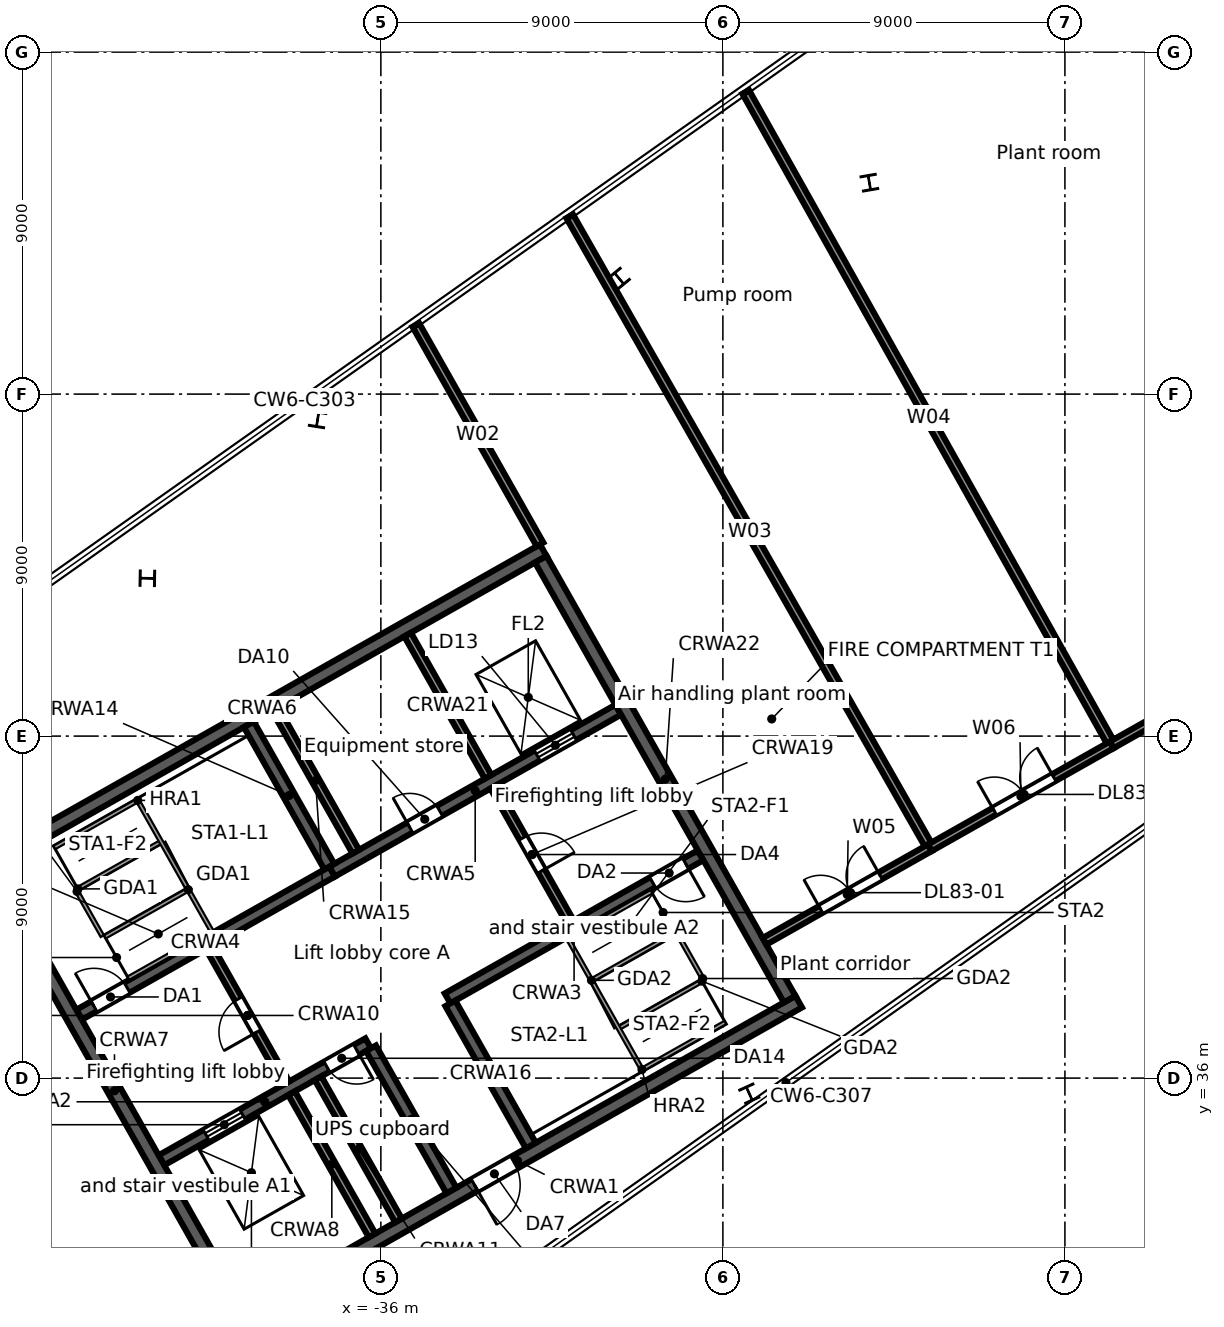
"""IFC4 building model, lengths in metres.
Left out: names, types, materials, properties, quantities, classifications, styles, units other than length and angle.
Written with IfcOpenShell. Run it as: python <this file> out.ifc"""

import sys

from ifc_helpers import new_model, si_unit, direction, frame, frame_2d, origin, origin_2d, place, context, subcontext, project, spatial, rectangle, i_section, extrude, element, fill, save


model = new_model("IFC4")
c1 = context("Model", 3, precision=1e-05, world=origin(), true_north=direction((0.0, 1.0)))
c2 = subcontext(c1, "Body", "Model", "MODEL_VIEW")
j1 = project(units=[si_unit("LENGTHUNIT", "METRE"), si_unit("PLANEANGLEUNIT", "RADIAN")], contexts=[c1])
p1 = place(None, origin())
s1 = spatial("IfcSite", under=j1, at=p1, CompositionType="ELEMENT")
p2 = place(p1, origin())
s2 = spatial("IfcBuilding", under=s1, at=p2, CompositionType="ELEMENT")
p3 = place(p2, frame((0.0, 0.0, 361.3)))
s3 = spatial("IfcBuildingStorey", under=s2, at=p3, CompositionType="ELEMENT", Elevation=361.3)
p4 = place(p3, frame((-42.144, 49.153, 0.0), z_axis=(0.0, 0.0, 1.0), x_axis=(0.017539659542, 0.999846168339, 0.0)))
e1 = element("IfcColumn", 1, at=p4, inside=s3, PredefinedType="COLUMN", context=c2, shape_type="SweptSolid", body=[
    extrude(i_section(OverallWidth=0.4, OverallDepth=0.4, WebThickness=0.013, FlangeThickness=0.021, FilletRadius=0.022, at=origin_2d()), origin(), (0.0, 0.0, 1.0), 3.6),
])
for number, where, z_axis, x_axis in (
    (2, (-23.146, 59.563, -0.3), (0.0, 0.0, 1.0), (0.985, 0.171, 0.0)),
    (3, (-29.729, 57.042, -0.3), (0.0, 0.0, 1.0), (-0.773, -0.635, 0.0)),
    (4, (-37.664, 53.334, -0.3), (0.0, 0.0, 1.0), (-0.987, 0.158, 0.0)),
    (5, (-26.305, 35.591, -0.3), (0.0, 0.0, 1.0), (0.911, 0.413, 0.0)),
):
    element("IfcColumn", number, at=place(p3, frame(where, z_axis=z_axis, x_axis=x_axis)), inside=s3, PredefinedType="COLUMN", context=c2, shape_type="SweptSolid", body=[
        extrude(i_section(OverallWidth=0.4, OverallDepth=0.4, WebThickness=0.013, FlangeThickness=0.021, FilletRadius=0.022, at=origin_2d()), origin(), (0.0, 0.0, 1.0), 3.9),
    ])
p5 = place(p3, frame((-44.119, 26.509, 0.0), z_axis=(0.0, 0.0, 1.0), x_axis=(-0.857168693653, 0.515035756644, 0.0)))
e6 = element("IfcWall", 6, at=p5, inside=s3, PredefinedType="STANDARD", context=c2, shape_type="SweptSolid", body=[
    extrude(rectangle(XDim=17.084, YDim=0.2, at=frame_2d((8.542, 0.0))), origin(), (0.0, 0.0, 1.0), 3.3),
])
p6 = place(p3, frame((-39.801, 29.64, 0.0), z_axis=(0.0, 0.0, 1.0), x_axis=(0.870359753402, 0.492416388494, 0.0)))
e7 = element("IfcWall", 7, at=p6, inside=s3, PredefinedType="SOLIDWALL", context=c2, shape_type="SweptSolid", body=[
    extrude(rectangle(XDim=17.0, YDim=0.35, at=frame_2d((8.5, 0.0))), origin(), (0.0, 0.0, 1.0), 3.3),
])
p7 = place(p6, frame((7.2, 0.0, 0.0)))
e8 = element("IfcOpeningElement", 8, at=p7, cuts=e7, PredefinedType="OPENING", context=c2, shape_type="SweptSolid", body=[
    extrude(rectangle(XDim=1.2, YDim=2.1, at=frame_2d((0.6, 1.05))), frame((0.0, 0.185, 0.0), z_axis=(0.0, -1.0, 0.0), x_axis=(1.0, 0.0, 0.0)), (0.0, 0.0, 1.0), 0.37),
])
p8 = place(p3, frame((-41.774, 33.838, 0.0), z_axis=(0.0, 0.0, 1.0), x_axis=(0.870355415866, 0.492424055132, 0.0)))
e9 = element("IfcWall", 9, at=p8, inside=s3, PredefinedType="SOLIDWALL", context=c2, shape_type="SweptSolid", body=[
    extrude(rectangle(XDim=6.25, YDim=0.3, at=frame_2d((3.125, 0.0))), origin(), (0.0, 0.0, 1.0), 3.3),
])
p9 = place(p8, frame((1.35, 0.0, 0.0)))
e10 = element("IfcOpeningElement", 10, at=p9, cuts=e9, PredefinedType="OPENING", context=c2, shape_type="SweptSolid", body=[
    extrude(rectangle(XDim=1.1, YDim=2.1, at=frame_2d((0.55, 1.05))), frame((0.0, 0.16, 0.0), z_axis=(0.0, -1.0, 0.0), x_axis=(1.0, 0.0, 0.0)), (0.0, 0.0, 1.0), 0.32),
])
p10 = place(p8, frame((5.0, 0.0, 0.0)))
e11 = element("IfcOpeningElement", 11, at=p10, cuts=e9, PredefinedType="OPENING", context=c2, shape_type="SweptSolid", body=[
    extrude(rectangle(XDim=0.9, YDim=2.1, at=frame_2d((0.45, 1.05))), frame((0.0, 0.16, 0.0), z_axis=(0.0, -1.0, 0.0), x_axis=(1.0, 0.0, 0.0)), (0.0, 0.0, 1.0), 0.32),
])
p11 = place(p3, frame((-34.245, 38.097, 0.0), z_axis=(0.0, 0.0, 1.0), x_axis=(0.870352347706, 0.49242947804, 0.0)))
e12 = element("IfcWall", 12, at=p11, inside=s3, PredefinedType="SOLIDWALL", context=c2, shape_type="SweptSolid", body=[
    extrude(rectangle(XDim=7.65, YDim=0.3, at=frame_2d((3.825, 0.0))), origin(), (0.0, 0.0, 1.0), 3.3),
])
p12 = place(p11, frame((6.2, 0.0, 0.0)))
e13 = element("IfcOpeningElement", 13, at=p12, cuts=e12, PredefinedType="OPENING", context=c2, shape_type="SweptSolid", body=[
    extrude(rectangle(XDim=1.0, YDim=2.1, at=frame_2d((0.5, 1.05))), frame((0.0, 0.16, 0.0), z_axis=(0.0, -1.0, 0.0), x_axis=(1.0, 0.0, 0.0)), (0.0, 0.0, 1.0), 0.32),
])
p13 = place(p3, frame((-43.94, 37.667, 0.0), z_axis=(0.0, 0.0, 1.0), x_axis=(0.870352347706, 0.49242947804, 0.0)))
e14 = element("IfcWall", 14, at=p13, inside=s3, PredefinedType="SOLIDWALL", context=c2, shape_type="SweptSolid", body=[
    extrude(rectangle(XDim=7.65, YDim=0.3, at=frame_2d((3.825, 0.0))), origin(), (0.0, 0.0, 1.0), 3.3),
])
p14 = place(p13, frame((0.45, 0.0, 0.0)))
e15 = element("IfcOpeningElement", 15, at=p14, cuts=e14, PredefinedType="OPENING", context=c2, shape_type="SweptSolid", body=[
    extrude(rectangle(XDim=1.0, YDim=2.1, at=frame_2d((0.5, 1.05))), frame((0.0, 0.16, 0.0), z_axis=(0.0, -1.0, 0.0), x_axis=(1.0, 0.0, 0.0)), (0.0, 0.0, 1.0), 0.32),
])
p15 = place(p3, frame((-37.282, 41.435, 0.0), z_axis=(0.0, 0.0, 1.0), x_axis=(0.870364588774, 0.492407841741, 0.0)))
e16 = element("IfcWall", 16, at=p15, inside=s3, PredefinedType="SOLIDWALL", context=c2, shape_type="SweptSolid", body=[
    extrude(rectangle(XDim=8.65, YDim=0.3, at=frame_2d((4.325, 0.0))), origin(), (0.0, 0.0, 1.0), 3.3),
])
p16 = place(p15, frame((6.2, 0.0, 0.0)))
e17 = element("IfcOpeningElement", 17, at=p16, cuts=e16, PredefinedType="OPENING", context=c2, shape_type="SweptSolid", body=[
    extrude(rectangle(XDim=1.1, YDim=2.1, at=frame_2d((0.55, 1.05))), frame((0.0, 0.16, 0.0), z_axis=(0.0, -1.0, 0.0), x_axis=(1.0, 0.0, 0.0)), (0.0, 0.0, 1.0), 0.32),
])
p17 = place(p15, frame((2.35, 0.0, 0.0)))
e18 = element("IfcOpeningElement", 18, at=p17, cuts=e16, PredefinedType="OPENING", context=c2, shape_type="SweptSolid", body=[
    extrude(rectangle(XDim=0.9, YDim=2.1, at=frame_2d((0.45, 1.05))), frame((0.0, 0.16, 0.0), z_axis=(0.0, -1.0, 0.0), x_axis=(1.0, 0.0, 0.0)), (0.0, 0.0, 1.0), 0.32),
])
p18 = place(p3, frame((-46.522, 41.521, 0.0), z_axis=(0.0, 0.0, 1.0), x_axis=(0.870359753402, 0.492416388494, 0.0)))
e19 = element("IfcWall", 19, at=p18, inside=s3, PredefinedType="SOLIDWALL", context=c2, shape_type="SweptSolid", body=[
    extrude(rectangle(XDim=17.0, YDim=0.35, at=frame_2d((8.5, 0.0))), origin(), (0.0, 0.0, 1.0), 3.3),
])
p19 = place(p3, frame((-46.284, 41.454, 0.0), z_axis=(0.0, 0.0, 1.0), x_axis=(0.492429810477, -0.870352159619, 0.0)))
e20 = element("IfcWall", 20, at=p19, inside=s3, PredefinedType="SOLIDWALL", context=c2, shape_type="SweptSolid", body=[
    extrude(rectangle(XDim=13.3, YDim=0.35, at=frame_2d((6.65, 0.0))), origin(), (0.0, 0.0, 1.0), 3.3),
])
p20 = place(p3, frame((-38.349, 35.603, 0.0), z_axis=(0.0, 0.0, 1.0), x_axis=(0.492410799949, -0.870362915164, 0.0)))
e21 = element("IfcWall", 21, at=p20, inside=s3, PredefinedType="SOLIDWALL", context=c2, shape_type="SweptSolid", body=[
    extrude(rectangle(XDim=4.3, YDim=0.2, at=frame_2d((2.15, 0.0))), origin(), (0.0, 0.0, 1.0), 3.3),
])
p21 = place(p3, frame((-40.516, 39.433, 0.0), z_axis=(0.0, 0.0, 1.0), x_axis=(0.492453559952, -0.87033872216, 0.0)))
e22 = element("IfcWall", 22, at=p21, inside=s3, PredefinedType="PARTITIONING", context=c2, shape_type="SweptSolid", body=[
    extrude(rectangle(XDim=4.1, YDim=0.2, at=frame_2d((2.05, 0.0))), origin(), (0.0, 0.0, 1.0), 3.3),
])
p22 = place(p21, frame((1.55, 0.0, 0.0)))
e23 = element("IfcOpeningElement", 23, at=p22, cuts=e22, PredefinedType="OPENING", context=c2, shape_type="SweptSolid", body=[
    extrude(rectangle(XDim=1.0, YDim=2.1, at=frame_2d((0.5, 1.05))), frame((0.0, 0.11, 0.0), z_axis=(0.0, -1.0, 0.0), x_axis=(1.0, 0.0, 0.0)), (0.0, 0.0, 1.0), 0.22),
])
p23 = place(p3, frame((-37.653, 35.997, 0.0), z_axis=(0.0, 0.0, 1.0), x_axis=(0.492435133428, -0.870349147967, 0.0)))
e24 = element("IfcWall", 24, at=p23, inside=s3, PredefinedType="SOLIDWALL", context=c2, shape_type="SweptSolid", body=[
    extrude(rectangle(XDim=4.3, YDim=0.2, at=frame_2d((2.15, 0.0))), origin(), (0.0, 0.0, 1.0), 3.3),
])
p24 = place(p3, frame((-36.26, 36.785, 0.0), z_axis=(0.0, 0.0, 1.0), x_axis=(0.492435133428, -0.870349147967, 0.0)))
e25 = element("IfcWall", 25, at=p24, inside=s3, PredefinedType="SOLIDWALL", context=c2, shape_type="SweptSolid", body=[
    extrude(rectangle(XDim=4.3, YDim=0.3, at=frame_2d((2.15, 0.0))), origin(), (0.0, 0.0, 1.0), 3.3),
])
p25 = place(p3, frame((-39.473, 45.308, 0.0), z_axis=(0.0, 0.0, 1.0), x_axis=(0.492410799949, -0.870362915164, 0.0)))
e26 = element("IfcWall", 26, at=p25, inside=s3, PredefinedType="SOLIDWALL", context=c2, shape_type="SweptSolid", body=[
    extrude(rectangle(XDim=4.3, YDim=0.3, at=frame_2d((2.15, 0.0))), origin(), (0.0, 0.0, 1.0), 3.3),
])
p26 = place(p3, frame((-38.777, 45.701, 0.0), z_axis=(0.0, 0.0, 1.0), x_axis=(0.492435133428, -0.870349147967, 0.0)))
e27 = element("IfcWall", 27, at=p26, inside=s3, PredefinedType="SOLIDWALL", context=c2, shape_type="SweptSolid", body=[
    extrude(rectangle(XDim=4.3, YDim=0.2, at=frame_2d((2.15, 0.0))), origin(), (0.0, 0.0, 1.0), 3.3),
])
p27 = place(p3, frame((-34.171, 37.967, 0.0), z_axis=(0.0, 0.0, 1.0), x_axis=(0.492435133428, -0.870349147967, 0.0)))
e28 = element("IfcWall", 28, at=p27, inside=s3, PredefinedType="SOLIDWALL", context=c2, shape_type="SweptSolid", body=[
    extrude(rectangle(XDim=4.3, YDim=0.3, at=frame_2d((2.15, 0.0))), origin(), (0.0, 0.0, 1.0), 3.3),
])
p28 = place(p3, frame((-33.031, 43.667, 0.0), z_axis=(0.0, 0.0, 1.0), x_axis=(0.492408451753, -0.87036424366, 0.0)))
e29 = element("IfcWall", 29, at=p28, inside=s3, PredefinedType="PARTITIONING", context=c2, shape_type="SweptSolid", body=[
    extrude(rectangle(XDim=4.1, YDim=0.2, at=frame_2d((2.05, 0.0))), origin(), (0.0, 0.0, 1.0), 3.3),
])
p29 = place(p28, frame((1.55, 0.0, 0.0)))
e30 = element("IfcOpeningElement", 30, at=p29, cuts=e29, PredefinedType="OPENING", context=c2, shape_type="SweptSolid", body=[
    extrude(rectangle(XDim=1.0, YDim=2.1, at=frame_2d((0.5, 1.05))), frame((0.0, 0.11, 0.0), z_axis=(0.0, -1.0, 0.0), x_axis=(1.0, 0.0, 0.0)), (0.0, 0.0, 1.0), 0.22),
])
p30 = place(p3, frame((-35.296, 47.671, 0.0), z_axis=(0.0, 0.0, 1.0), x_axis=(0.492435133428, -0.870349147967, 0.0)))
e31 = element("IfcWall", 31, at=p30, inside=s3, PredefinedType="SOLIDWALL", context=c2, shape_type="SweptSolid", body=[
    extrude(rectangle(XDim=4.3, YDim=0.2, at=frame_2d((2.15, 0.0))), origin(), (0.0, 0.0, 1.0), 3.3),
])
p31 = place(p3, frame((-31.792, 49.653, 0.0), z_axis=(0.0, 0.0, 1.0), x_axis=(0.492421943245, -0.870356610712, 0.0)))
e32 = element("IfcWall", 32, at=p31, inside=s3, PredefinedType="SOLIDWALL", context=c2, shape_type="SweptSolid", body=[
    extrude(rectangle(XDim=13.3, YDim=0.35, at=frame_2d((6.65, 0.0))), origin(), (0.0, 0.0, 1.0), 3.3),
])
p32 = place(p3, frame((-35.08, 55.819, 0.0), z_axis=(0.0, 0.0, 1.0), x_axis=(0.49249727422, -0.870313986379, 0.0)))
e33 = element("IfcWall", 33, at=p32, inside=s3, PredefinedType="PARTITIONING", context=c2, shape_type="SweptSolid", body=[
    extrude(rectangle(XDim=6.636, YDim=0.2, at=frame_2d((3.318, 0.0))), origin(), (0.0, 0.0, 1.0), 2.68),
])
p33 = place(p3, frame((-31.031, 58.679, 0.0), z_axis=(0.0, 0.0, 1.0), x_axis=(0.495492853456, -0.868612014753, 0.0)))
e34 = element("IfcWall", 34, at=p33, inside=s3, PredefinedType="PARTITIONING", context=c2, shape_type="SweptSolid", body=[
    extrude(rectangle(XDim=19.13, YDim=0.2, at=frame_2d((9.565, 0.0))), origin(), (0.0, 0.0, 1.0), 2.68),
])
p34 = place(p3, frame((-26.399, 61.95, 0.0), z_axis=(0.0, 0.0, 1.0), x_axis=(0.489116217078, -0.872218622933, 0.0)))
e35 = element("IfcWall", 35, at=p34, inside=s3, PredefinedType="PARTITIONING", context=c2, shape_type="SweptSolid", body=[
    extrude(rectangle(XDim=19.697, YDim=0.2, at=frame_2d((9.848, 0.0))), origin(), (0.0, 0.0, 1.0), 2.68),
])
p35 = place(p3, frame((-25.904, 39.6, 0.0), z_axis=(0.0, 0.0, 1.0), x_axis=(0.870386362759, 0.492369352746, 0.0)))
e36 = element("IfcWall", 36, at=p35, inside=s3, PredefinedType="PARTITIONING", context=c2, shape_type="SweptSolid", body=[
    extrude(rectangle(XDim=5.0, YDim=0.2, at=frame_2d((2.5, 0.0))), origin(), (0.0, 0.0, 1.0), 3.3),
])
p36 = place(p35, frame((1.7, 0.0, 0.0)))
e37 = element("IfcOpeningElement", 37, at=p36, cuts=e36, PredefinedType="OPENING", context=c2, shape_type="SweptSolid", body=[
    extrude(rectangle(XDim=1.8, YDim=2.1, at=frame_2d((0.9, 1.05))), frame((0.0, 0.11, 0.0), z_axis=(0.0, -1.0, 0.0), x_axis=(1.0, 0.0, 0.0)), (0.0, 0.0, 1.0), 0.22),
])
p37 = place(p3, frame((-21.552, 42.062, 0.0), z_axis=(0.0, 0.0, 1.0), x_axis=(0.870387515286, 0.492367315359, 0.0)))
e38 = element("IfcWall", 38, at=p37, inside=s3, PredefinedType="PARTITIONING", context=c2, shape_type="SweptSolid", body=[
    extrude(rectangle(XDim=5.5, YDim=0.2, at=frame_2d((2.75, 0.0))), origin(), (0.0, 0.0, 1.0), 3.3),
])
p38 = place(p37, frame((1.95, 0.0, 0.0)))
e39 = element("IfcOpeningElement", 39, at=p38, cuts=e38, PredefinedType="OPENING", context=c2, shape_type="SweptSolid", body=[
    extrude(rectangle(XDim=1.8, YDim=2.1, at=frame_2d((0.9, 1.05))), frame((0.0, 0.11, 0.0), z_axis=(0.0, -1.0, 0.0), x_axis=(1.0, 0.0, 0.0)), (0.0, 0.0, 1.0), 0.22),
])
p39 = place(p3, frame((-16.765, 44.77, 0.0), z_axis=(0.0, 0.0, 1.0), x_axis=(0.870320026037, 0.492486601116, 0.0)))
e40 = element("IfcWall", 40, at=p39, inside=s3, PredefinedType="PARTITIONING", context=c2, shape_type="SweptSolid", body=[
    extrude(rectangle(XDim=6.126, YDim=0.2, at=frame_2d((3.063, 0.0))), origin(), (0.0, 0.0, 1.0), 3.3),
])
p40 = place(p39, frame((2.2, 0.0, 0.0)))
e41 = element("IfcOpeningElement", 41, at=p40, cuts=e40, PredefinedType="OPENING", context=c2, shape_type="SweptSolid", body=[
    extrude(rectangle(XDim=1.8, YDim=2.1, at=frame_2d((0.9, 1.05))), frame((0.0, 0.11, 0.0), z_axis=(0.0, -1.0, 0.0), x_axis=(1.0, 0.0, 0.0)), (0.0, 0.0, 1.0), 0.22),
])
p41 = place(p16, origin())
e42 = element("IfcDoor", 42, at=p41, inside=s3, OperationType="DOUBLE_DOOR_SLIDING", PredefinedType="DOOR", context=c2, shape_type="SweptSolid", body=[
    extrude(rectangle(XDim=1.1, YDim=2.1, at=frame_2d((0.55, 1.05))), frame((0.0, 0.025, 0.0), z_axis=(0.0, -1.0, 0.0), x_axis=(1.0, 0.0, 0.0)), (0.0, 0.0, 1.0), 0.05),
])
fill(e17, e42)
p42 = place(p9, origin())
e43 = element("IfcDoor", 43, at=p42, inside=s3, OperationType="DOUBLE_DOOR_SLIDING", PredefinedType="DOOR", context=c2, shape_type="SweptSolid", body=[
    extrude(rectangle(XDim=1.1, YDim=2.1, at=frame_2d((0.55, 1.05))), frame((0.0, 0.025, 0.0), z_axis=(0.0, -1.0, 0.0), x_axis=(1.0, 0.0, 0.0)), (0.0, 0.0, 1.0), 0.05),
])
fill(e10, e43)
p43 = place(p14, origin())
e44 = element("IfcDoor", 44, at=p43, inside=s3, OperationType="SINGLE_SWING_LEFT", PredefinedType="DOOR", context=c2, shape_type="SweptSolid", body=[
    extrude(rectangle(XDim=1.0, YDim=2.1, at=frame_2d((0.5, 1.05))), frame((0.0, 0.025, 0.0), z_axis=(0.0, -1.0, 0.0), x_axis=(1.0, 0.0, 0.0)), (0.0, 0.0, 1.0), 0.05),
])
fill(e15, e44)
p44 = place(p12, frame((1.0, 0.0, 0.0), z_axis=(0.0, 0.0, 1.0), x_axis=(-1.0, 0.0, 0.0)))
e45 = element("IfcDoor", 45, at=p44, inside=s3, OperationType="SINGLE_SWING_LEFT", PredefinedType="DOOR", context=c2, shape_type="SweptSolid", body=[
    extrude(rectangle(XDim=1.0, YDim=2.1, at=frame_2d((0.5, 1.05))), frame((0.0, 0.025, 0.0), z_axis=(0.0, -1.0, 0.0), x_axis=(1.0, 0.0, 0.0)), (0.0, 0.0, 1.0), 0.05),
])
fill(e13, e45)
p45 = place(p22, frame((1.0, 0.0, 0.0), z_axis=(0.0, 0.0, 1.0), x_axis=(-1.0, 0.0, 0.0)))
e46 = element("IfcDoor", 46, at=p45, inside=s3, OperationType="SINGLE_SWING_LEFT", PredefinedType="DOOR", context=c2, shape_type="SweptSolid", body=[
    extrude(rectangle(XDim=1.0, YDim=2.1, at=frame_2d((0.5, 1.05))), frame((0.0, 0.025, 0.0), z_axis=(0.0, -1.0, 0.0), x_axis=(1.0, 0.0, 0.0)), (0.0, 0.0, 1.0), 0.05),
])
fill(e23, e46)
p46 = place(p29, origin())
e47 = element("IfcDoor", 47, at=p46, inside=s3, OperationType="SINGLE_SWING_RIGHT", PredefinedType="DOOR", context=c2, shape_type="SweptSolid", body=[
    extrude(rectangle(XDim=1.0, YDim=2.1, at=frame_2d((0.5, 1.05))), frame((0.0, 0.025, 0.0), z_axis=(0.0, -1.0, 0.0), x_axis=(1.0, 0.0, 0.0)), (0.0, 0.0, 1.0), 0.05),
])
fill(e30, e47)
p47 = place(p7, frame((1.2, 0.0, 0.0), z_axis=(0.0, 0.0, 1.0), x_axis=(-1.0, 0.0, 0.0)))
e48 = element("IfcDoor", 48, at=p47, inside=s3, OperationType="SINGLE_SWING_RIGHT", PredefinedType="DOOR", context=c2, shape_type="SweptSolid", body=[
    extrude(rectangle(XDim=1.2, YDim=2.1, at=frame_2d((0.6, 1.05))), frame((0.0, 0.025, 0.0), z_axis=(0.0, -1.0, 0.0), x_axis=(1.0, 0.0, 0.0)), (0.0, 0.0, 1.0), 0.05),
])
fill(e8, e48)
p48 = place(p17, origin())
e49 = element("IfcDoor", 49, at=p48, inside=s3, OperationType="SINGLE_SWING_LEFT", PredefinedType="DOOR", context=c2, shape_type="SweptSolid", body=[
    extrude(rectangle(XDim=0.9, YDim=2.1, at=frame_2d((0.45, 1.05))), frame((0.0, 0.025, 0.0), z_axis=(0.0, -1.0, 0.0), x_axis=(1.0, 0.0, 0.0)), (0.0, 0.0, 1.0), 0.05),
])
fill(e18, e49)
p49 = place(p10, frame((0.9, 0.0, 0.0), z_axis=(0.0, 0.0, 1.0), x_axis=(-1.0, 0.0, 0.0)))
e50 = element("IfcDoor", 50, at=p49, inside=s3, OperationType="SINGLE_SWING_LEFT", PredefinedType="DOOR", context=c2, shape_type="SweptSolid", body=[
    extrude(rectangle(XDim=0.9, YDim=2.1, at=frame_2d((0.45, 1.05))), frame((0.0, 0.025, 0.0), z_axis=(0.0, -1.0, 0.0), x_axis=(1.0, 0.0, 0.0)), (0.0, 0.0, 1.0), 0.05),
])
fill(e11, e50)
p50 = place(p36, origin())
e51 = element("IfcDoor", 51, at=p50, inside=s3, OperationType="DOUBLE_DOOR_SINGLE_SWING", PredefinedType="DOOR", context=c2, shape_type="SweptSolid", body=[
    extrude(rectangle(XDim=1.8, YDim=2.1, at=frame_2d((0.9, 1.05))), frame((0.0, 0.025, 0.0), z_axis=(0.0, -1.0, 0.0), x_axis=(1.0, 0.0, 0.0)), (0.0, 0.0, 1.0), 0.05),
])
fill(e37, e51)
p51 = place(p38, origin())
e52 = element("IfcDoor", 52, at=p51, inside=s3, OperationType="DOUBLE_DOOR_SINGLE_SWING", PredefinedType="DOOR", context=c2, shape_type="SweptSolid", body=[
    extrude(rectangle(XDim=1.8, YDim=2.1, at=frame_2d((0.9, 1.05))), frame((0.0, 0.025, 0.0), z_axis=(0.0, -1.0, 0.0), x_axis=(1.0, 0.0, 0.0)), (0.0, 0.0, 1.0), 0.05),
])
fill(e39, e52)
save(model, sys.argv[1])
